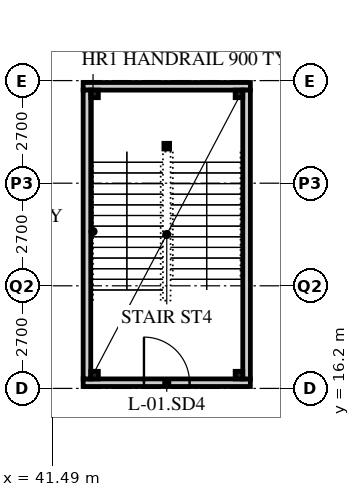
"""IFC4 building model, lengths in metres.
Left out: names, types, materials, properties, quantities, classifications, styles, units other than length and angle.
Written with IfcOpenShell. Run it as: python <this file> out.ifc"""

import sys

from ifc_helpers import new_model, si_unit, direction, frame, frame_2d, origin, origin_2d, place, context, subcontext, project, spatial, rectangle, hollow_rectangle, extrude, element, fill, save


model = new_model("IFC4")
c1 = context("Model", 3, precision=1e-05, world=origin(), true_north=direction((0.0, 1.0)))
c2 = subcontext(c1, "Body", "Model", "MODEL_VIEW")
j1 = project(units=[si_unit("LENGTHUNIT", "METRE"), si_unit("PLANEANGLEUNIT", "RADIAN")], contexts=[c1])
p1 = place(None, origin())
s1 = spatial("IfcSite", under=j1, at=p1, CompositionType="ELEMENT")
p2 = place(p1, origin())
s2 = spatial("IfcBuilding", under=s1, at=p2, CompositionType="ELEMENT")
p3 = place(p2, frame((0.0, 0.0, -4.2)))
s3 = spatial("IfcBuildingStorey", under=s2, at=p3, CompositionType="ELEMENT", Elevation=-4.2)
p4 = place(p3, frame((42.3, 16.35, 0.0), z_axis=(0.0, 0.0, 1.0), x_axis=(1.0, 0.0, 0.0)))
e1 = element("IfcWall", 1, at=p4, inside=s3, PredefinedType="SOLIDWALL", context=c2, shape_type="SweptSolid", body=[
    extrude(rectangle(XDim=4.4, YDim=0.2, at=frame_2d((2.2, 0.0))), origin(), (0.0, 0.0, 1.0), 3.338),
])
p5 = place(p4, frame((1.6, 0.0, 0.0)))
e2 = element("IfcOpeningElement", 2, at=p5, cuts=e1, PredefinedType="OPENING", context=c2, shape_type="SweptSolid", body=[
    extrude(rectangle(XDim=1.2, YDim=2.1, at=frame_2d((0.6, 1.05))), frame((0.0, 0.11, 0.0), z_axis=(0.0, -1.0, 0.0), x_axis=(1.0, 0.0, 0.0)), (0.0, 0.0, 1.0), 0.22),
])
p6 = place(p3, frame((42.3, 24.15, 0.0), z_axis=(0.0, 0.0, 1.0), x_axis=(1.0, 0.0, 0.0)))
e3 = element("IfcWall", 3, at=p6, inside=s3, PredefinedType="SOLIDWALL", context=c2, shape_type="SweptSolid", body=[
    extrude(rectangle(XDim=4.4, YDim=0.2, at=frame_2d((2.2, 0.0))), origin(), (0.0, 0.0, 1.0), 3.338),
])
for number, where, z_axis, x_axis in (
    (4, (42.4, 16.45, 0.0), (0.0, 0.0, 1.0), (0.0, 1.0, 0.0)),
    (5, (46.6, 16.45, 0.0), (0.0, 0.0, 1.0), (0.0, 1.0, 0.0)),
):
    element("IfcWall", number, at=place(p3, frame(where, z_axis=z_axis, x_axis=x_axis)), inside=s3, PredefinedType="SOLIDWALL", context=c2, shape_type="SweptSolid", body=[
        extrude(rectangle(XDim=7.6, YDim=0.2, at=frame_2d((3.8, 0.0))), origin(), (0.0, 0.0, 1.0), 3.95),
    ])
for number, where, z_axis, x_axis in (
    (6, (42.6, 23.95, 0.0), (0.0, 0.0, 1.0), (1.0, 0.0, 0.0)),
    (7, (46.4, 23.95, 0.0), (0.0, 0.0, 1.0), (1.0, 0.0, 0.0)),
    (8, (42.6, 16.55, 0.0), (0.0, 0.0, 1.0), (1.0, 0.0, 0.0)),
    (9, (46.4, 16.55, 0.0), (0.0, 0.0, 1.0), (1.0, 0.0, 0.0)),
):
    element("IfcColumn", number, at=place(p3, frame(where, z_axis=z_axis, x_axis=x_axis)), inside=s3, PredefinedType="COLUMN", context=c2, shape_type="SweptSolid", body=[
        extrude(hollow_rectangle(XDim=0.2, YDim=0.2, WallThickness=0.012, at=origin_2d()), origin(), (0.0, 0.0, 1.0), 4.2),
    ])
p7 = place(p3, frame((44.5, 22.575, 0.0), z_axis=(0.0, 0.0, 1.0), x_axis=(1.0, 0.0, 0.0)))
e10 = element("IfcColumn", 10, at=p7, inside=s3, PredefinedType="COLUMN", context=c2, shape_type="SweptSolid", body=[
    extrude(hollow_rectangle(XDim=0.15, YDim=0.15, WallThickness=0.01, at=origin_2d()), origin(), (0.0, 0.0, 1.0), 4.2),
])
p8 = place(p5, origin())
e11 = element("IfcDoor", 11, at=p8, inside=s3, OperationType="SINGLE_SWING_LEFT", PredefinedType="DOOR", context=c2, shape_type="SweptSolid", body=[
    extrude(rectangle(XDim=1.2, YDim=2.1, at=frame_2d((0.6, 1.05))), frame((0.0, 0.025, 0.0), z_axis=(0.0, -1.0, 0.0), x_axis=(1.0, 0.0, 0.0)), (0.0, 0.0, 1.0), 0.05),
])
fill(e2, e11)
save(model, sys.argv[1])
